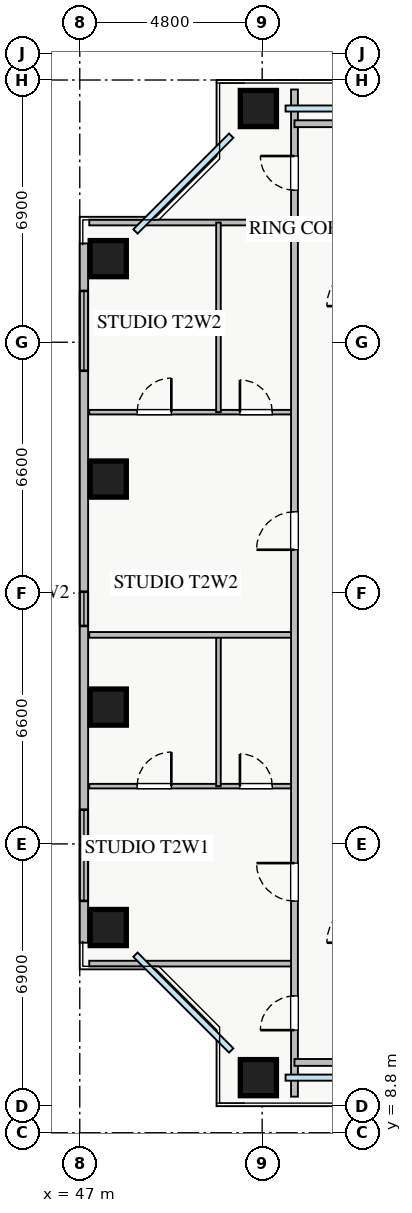
"""IFC4 building model, lengths in metres.
Left out: names, types, materials, properties, quantities, classifications, styles, units other than length and angle.
Written with IfcOpenShell. Run it as: python <this file> out.ifc"""

import sys

from ifc_helpers import new_model, si_unit, direction, frame, frame_2d, origin, origin_2d, place, context, subcontext, project, spatial, rectangle, extrude, source, transform, mapped, element, fill, save


model = new_model("IFC4")
c1 = context("Model", 3, precision=1e-05, world=origin(), true_north=direction((0.0, 1.0)))
c2 = subcontext(c1, "Body", "Model", "MODEL_VIEW")
j1 = project(units=[si_unit("LENGTHUNIT", "METRE"), si_unit("PLANEANGLEUNIT", "RADIAN")], contexts=[c1])
p1 = place(None, origin())
s1 = spatial("IfcSite", under=j1, at=p1, CompositionType="ELEMENT")
p2 = place(p1, origin())
s2 = spatial("IfcBuilding", under=s1, at=p2, CompositionType="ELEMENT")
p3 = place(p2, frame((0.0, 0.0, 56.75)))
s3 = spatial("IfcBuildingStorey", under=s2, at=p3, CompositionType="ELEMENT", Elevation=56.75)
m1 = source(origin(), c2, "Body", "SweptSolid", [
    extrude(rectangle(XDim=0.95, YDim=0.95, at=origin_2d()), origin(), (0.0, 0.0, 1.0), 3.25),
])
for number, where, z_axis, x_axis in (
    (1, (51.7, 10.25, 0.0), (0.0, 0.0, 1.0), (1.0, 0.0, 0.0)),
    (2, (51.7, 35.75, 0.0), (0.0, 0.0, 1.0), (1.0, 0.0, 0.0)),
    (3, (47.75, 14.2, 0.0), (0.0, 0.0, 1.0), (1.0, 0.0, 0.0)),
    (4, (47.75, 20.0, 0.0), (0.0, 0.0, 1.0), (1.0, 0.0, 0.0)),
    (5, (47.75, 26.0, 0.0), (0.0, 0.0, 1.0), (1.0, 0.0, 0.0)),
    (6, (47.75, 31.8, 0.0), (0.0, 0.0, 1.0), (1.0, 0.0, 0.0)),
):
    element("IfcColumn", number, at=place(p3, frame(where, z_axis=z_axis, x_axis=x_axis)), inside=s3, PredefinedType="COLUMN", context=c2, shape_type="MappedRepresentation", body=[
        mapped(m1, transform((0.0, 0.0, 0.0), x_axis=(1.0, 0.0, 0.0), y_axis=(0.0, 1.0, 0.0), z_axis=(0.0, 0.0, 1.0), scale=1.0)),
    ])
p4 = place(p3, frame((47.11, 13.8, 0.0), z_axis=(0.0, 0.0, 1.0), x_axis=(0.0, 1.0, 0.0)))
e7 = element("IfcWall", 7, at=p4, inside=s3, PredefinedType="STANDARD", context=c2, shape_type="SweptSolid", body=[
    extrude(rectangle(XDim=18.4, YDim=0.22, at=frame_2d((9.2, 0.0))), origin(), (0.0, 0.0, 1.0), 2.61),
])
p5 = place(p4, frame((1.1, 0.0, 0.9)))
e8 = element("IfcOpeningElement", 8, at=p5, cuts=e7, PredefinedType="OPENING", context=c2, shape_type="SweptSolid", body=[
    extrude(rectangle(XDim=2.4, YDim=1.48, at=frame_2d((1.2, 0.74))), frame((0.0, 0.12, 0.0), z_axis=(0.0, -1.0, 0.0), x_axis=(1.0, 0.0, 0.0)), (0.0, 0.0, 1.0), 0.24),
])
p6 = place(p4, frame((15.05, 0.0, 0.9)))
e9 = element("IfcOpeningElement", 9, at=p6, cuts=e7, PredefinedType="OPENING", context=c2, shape_type="SweptSolid", body=[
    extrude(rectangle(XDim=2.1, YDim=1.48, at=frame_2d((1.05, 0.74))), frame((0.0, 0.12, 0.0), z_axis=(0.0, -1.0, 0.0), x_axis=(1.0, 0.0, 0.0)), (0.0, 0.0, 1.0), 0.24),
])
p7 = place(p4, frame((8.335, 0.0, 0.9)))
e10 = element("IfcOpeningElement", 10, at=p7, cuts=e7, PredefinedType="OPENING", context=c2, shape_type="SweptSolid", body=[
    extrude(rectangle(XDim=0.9, YDim=1.2, at=frame_2d((0.45, 0.6))), frame((0.0, 0.12, 0.0), z_axis=(0.0, -1.0, 0.0), x_axis=(1.0, 0.0, 0.0)), (0.0, 0.0, 1.0), 0.24),
])
for number, where, z_axis, x_axis in (
    (11, (47.25, 32.75, 0.0), (0.0, 0.0, 1.0), (1.0, 0.0, 0.0)),
    (12, (47.25, 13.25, 0.0), (0.0, 0.0, 1.0), (1.0, 0.0, 0.0)),
):
    element("IfcWall", number, at=place(p3, frame(where, z_axis=z_axis, x_axis=x_axis)), inside=s3, PredefinedType="PARTITIONING", context=c2, shape_type="SweptSolid", body=[
        extrude(rectangle(XDim=5.4, YDim=0.15, at=frame_2d((2.7, 0.0))), origin(), (0.0, 0.0, 1.0), 3.07),
    ])
p8 = place(p3, frame((47.25, 17.92, 0.0), z_axis=(0.0, 0.0, 1.0), x_axis=(1.0, 0.0, 0.0)))
e13 = element("IfcWall", 13, at=p8, inside=s3, PredefinedType="PLUMBINGWALL", context=c2, shape_type="SweptSolid", body=[
    extrude(rectangle(XDim=5.4, YDim=0.12, at=frame_2d((2.7, 0.0))), origin(), (0.0, 0.0, 1.0), 3.07),
])
p9 = place(p8, frame((1.26, 0.0, 0.0)))
e14 = element("IfcOpeningElement", 14, at=p9, cuts=e13, PredefinedType="OPENING", context=c2, shape_type="SweptSolid", body=[
    extrude(rectangle(XDim=0.9, YDim=2.05, at=frame_2d((0.45, 1.025))), frame((0.0, 0.07, 0.0), z_axis=(0.0, -1.0, 0.0), x_axis=(1.0, 0.0, 0.0)), (0.0, 0.0, 1.0), 0.14),
])
p10 = place(p8, frame((3.965, 0.0, 0.0)))
e15 = element("IfcOpeningElement", 15, at=p10, cuts=e13, PredefinedType="OPENING", context=c2, shape_type="SweptSolid", body=[
    extrude(rectangle(XDim=0.85, YDim=2.05, at=frame_2d((0.425, 1.025))), frame((0.0, 0.07, 0.0), z_axis=(0.0, -1.0, 0.0), x_axis=(1.0, 0.0, 0.0)), (0.0, 0.0, 1.0), 0.14),
])
p11 = place(p3, frame((50.65, 17.92, 0.0), z_axis=(0.0, 0.0, 1.0), x_axis=(0.0, 1.0, 0.0)))
e16 = element("IfcWall", 16, at=p11, inside=s3, PredefinedType="PLUMBINGWALL", context=c2, shape_type="SweptSolid", body=[
    extrude(rectangle(XDim=3.98, YDim=0.12, at=frame_2d((1.99, 0.0))), origin(), (0.0, 0.0, 1.0), 3.07),
])
p12 = place(p3, frame((47.25, 27.76, 0.0), z_axis=(0.0, 0.0, 1.0), x_axis=(1.0, 0.0, 0.0)))
e17 = element("IfcWall", 17, at=p12, inside=s3, PredefinedType="PLUMBINGWALL", context=c2, shape_type="SweptSolid", body=[
    extrude(rectangle(XDim=5.4, YDim=0.12, at=frame_2d((2.7, 0.0))), origin(), (0.0, 0.0, 1.0), 3.07),
])
p13 = place(p12, frame((1.26, 0.0, 0.0)))
e18 = element("IfcOpeningElement", 18, at=p13, cuts=e17, PredefinedType="OPENING", context=c2, shape_type="SweptSolid", body=[
    extrude(rectangle(XDim=0.9, YDim=2.05, at=frame_2d((0.45, 1.025))), frame((0.0, 0.07, 0.0), z_axis=(0.0, -1.0, 0.0), x_axis=(1.0, 0.0, 0.0)), (0.0, 0.0, 1.0), 0.14),
])
p14 = place(p12, frame((3.965, 0.0, 0.0)))
e19 = element("IfcOpeningElement", 19, at=p14, cuts=e17, PredefinedType="OPENING", context=c2, shape_type="SweptSolid", body=[
    extrude(rectangle(XDim=0.85, YDim=2.05, at=frame_2d((0.425, 1.025))), frame((0.0, 0.07, 0.0), z_axis=(0.0, -1.0, 0.0), x_axis=(1.0, 0.0, 0.0)), (0.0, 0.0, 1.0), 0.14),
])
p15 = place(p3, frame((50.65, 27.76, 0.0), z_axis=(0.0, 0.0, 1.0), x_axis=(0.0, 1.0, 0.0)))
e20 = element("IfcWall", 20, at=p15, inside=s3, PredefinedType="PLUMBINGWALL", context=c2, shape_type="SweptSolid", body=[
    extrude(rectangle(XDim=4.99, YDim=0.12, at=frame_2d((2.495, 0.0))), origin(), (0.0, 0.0, 1.0), 3.07),
])
p16 = place(p3, frame((47.25, 21.9, 0.0), z_axis=(0.0, 0.0, 1.0), x_axis=(1.0, 0.0, 0.0)))
e21 = element("IfcWall", 21, at=p16, inside=s3, PredefinedType="PARTITIONING", context=c2, shape_type="SweptSolid", body=[
    extrude(rectangle(XDim=5.4, YDim=0.15, at=frame_2d((2.7, 0.0))), origin(), (0.0, 0.0, 1.0), 3.07),
])
p17 = place(p3, frame((52.65, 9.75, 0.0), z_axis=(0.0, 0.0, 1.0), x_axis=(0.0, 1.0, 0.0)))
e22 = element("IfcWall", 22, at=p17, inside=s3, PredefinedType="PARTITIONING", context=c2, shape_type="SweptSolid", body=[
    extrude(rectangle(XDim=26.5, YDim=0.18, at=frame_2d((13.25, 0.0))), origin(), (0.0, 0.0, 1.0), 3.07),
])
p18 = place(p17, frame((23.85, 0.0, 0.0)))
e23 = element("IfcOpeningElement", 23, at=p18, cuts=e22, PredefinedType="OPENING", context=c2, shape_type="SweptSolid", body=[
    extrude(rectangle(XDim=0.9, YDim=2.05, at=frame_2d((0.45, 1.025))), frame((0.0, 0.1, 0.0), z_axis=(0.0, -1.0, 0.0), x_axis=(1.0, 0.0, 0.0)), (0.0, 0.0, 1.0), 0.2),
])
p19 = place(p17, frame((1.75, 0.0, 0.0)))
e24 = element("IfcOpeningElement", 24, at=p19, cuts=e22, PredefinedType="OPENING", context=c2, shape_type="SweptSolid", body=[
    extrude(rectangle(XDim=0.9, YDim=2.05, at=frame_2d((0.45, 1.025))), frame((0.0, 0.1, 0.0), z_axis=(0.0, -1.0, 0.0), x_axis=(1.0, 0.0, 0.0)), (0.0, 0.0, 1.0), 0.2),
])
p20 = place(p17, frame((5.145, 0.0, 0.0)))
e25 = element("IfcOpeningElement", 25, at=p20, cuts=e22, PredefinedType="OPENING", context=c2, shape_type="SweptSolid", body=[
    extrude(rectangle(XDim=1.0, YDim=2.05, at=frame_2d((0.5, 1.025))), frame((0.0, 0.1, 0.0), z_axis=(0.0, -1.0, 0.0), x_axis=(1.0, 0.0, 0.0)), (0.0, 0.0, 1.0), 0.2),
])
p21 = place(p17, frame((14.39, 0.0, 0.0)))
e26 = element("IfcOpeningElement", 26, at=p21, cuts=e22, PredefinedType="OPENING", context=c2, shape_type="SweptSolid", body=[
    extrude(rectangle(XDim=1.0, YDim=2.05, at=frame_2d((0.5, 1.025))), frame((0.0, 0.1, 0.0), z_axis=(0.0, -1.0, 0.0), x_axis=(1.0, 0.0, 0.0)), (0.0, 0.0, 1.0), 0.2),
])
p22 = place(p3, frame((52.65, 35.35, 0.0), z_axis=(0.0, 0.0, 1.0), x_axis=(1.0, 0.0, 0.0)))
e27 = element("IfcWall", 27, at=p22, inside=s3, PredefinedType="PARTITIONING", context=c2, shape_type="SweptSolid", body=[
    extrude(rectangle(XDim=17.0, YDim=0.18, at=frame_2d((8.5, 0.0))), origin(), (0.0, 0.0, 1.0), 3.07),
])
p23 = place(p22, frame((3.825, 0.0, 0.0)))
e28 = element("IfcOpeningElement", 28, at=p23, cuts=e27, PredefinedType="OPENING", context=c2, shape_type="SweptSolid", body=[
    extrude(rectangle(XDim=0.9, YDim=2.05, at=frame_2d((0.45, 1.025))), frame((0.0, 0.1, 0.0), z_axis=(0.0, -1.0, 0.0), x_axis=(1.0, 0.0, 0.0)), (0.0, 0.0, 1.0), 0.2),
])
p24 = place(p22, frame((12.325, 0.0, 0.0)))
e29 = element("IfcOpeningElement", 29, at=p24, cuts=e27, PredefinedType="OPENING", context=c2, shape_type="SweptSolid", body=[
    extrude(rectangle(XDim=0.9, YDim=2.05, at=frame_2d((0.45, 1.025))), frame((0.0, 0.1, 0.0), z_axis=(0.0, -1.0, 0.0), x_axis=(1.0, 0.0, 0.0)), (0.0, 0.0, 1.0), 0.2),
])
p25 = place(p3, frame((52.65, 10.65, 0.0), z_axis=(0.0, 0.0, 1.0), x_axis=(1.0, 0.0, 0.0)))
e30 = element("IfcWall", 30, at=p25, inside=s3, PredefinedType="PARTITIONING", context=c2, shape_type="SweptSolid", body=[
    extrude(rectangle(XDim=17.0, YDim=0.18, at=frame_2d((8.5, 0.0))), origin(), (0.0, 0.0, 1.0), 3.07),
])
p26 = place(p25, frame((4.375, 0.0, 0.0)))
e31 = element("IfcOpeningElement", 31, at=p26, cuts=e30, PredefinedType="OPENING", context=c2, shape_type="SweptSolid", body=[
    extrude(rectangle(XDim=0.9, YDim=2.05, at=frame_2d((0.45, 1.025))), frame((0.0, 0.1, 0.0), z_axis=(0.0, -1.0, 0.0), x_axis=(1.0, 0.0, 0.0)), (0.0, 0.0, 1.0), 0.2),
])
p27 = place(p25, frame((12.875, 0.0, 0.0)))
e32 = element("IfcOpeningElement", 32, at=p27, cuts=e30, PredefinedType="OPENING", context=c2, shape_type="SweptSolid", body=[
    extrude(rectangle(XDim=0.9, YDim=2.05, at=frame_2d((0.45, 1.025))), frame((0.0, 0.1, 0.0), z_axis=(0.0, -1.0, 0.0), x_axis=(1.0, 0.0, 0.0)), (0.0, 0.0, 1.0), 0.2),
])
m2 = source(origin(), c2, "Body", "SweptSolid", [
    extrude(rectangle(XDim=2.4, YDim=1.48, at=frame_2d((1.2, 0.74))), frame((0.0, 0.03, 0.0), z_axis=(0.0, -1.0, 0.0), x_axis=(1.0, 0.0, 0.0)), (0.0, 0.0, 1.0), 0.06),
])
p28 = place(p5, origin())
e33 = element("IfcWindow", 33, at=p28, inside=s3, PartitioningType="TRIPLE_PANEL_VERTICAL", PredefinedType="WINDOW", context=c2, shape_type="MappedRepresentation", body=[
    mapped(m2, transform((0.0, 0.0, 0.0), x_axis=(1.0, 0.0, 0.0), y_axis=(0.0, 1.0, 0.0), z_axis=(0.0, 0.0, 1.0), scale=1.0)),
])
fill(e8, e33)
m3 = source(origin(), c2, "Body", "SweptSolid", [
    extrude(rectangle(XDim=2.1, YDim=1.48, at=frame_2d((1.05, 0.74))), frame((0.0, 0.03, 0.0), z_axis=(0.0, -1.0, 0.0), x_axis=(1.0, 0.0, 0.0)), (0.0, 0.0, 1.0), 0.06),
])
p29 = place(p6, origin())
e34 = element("IfcWindow", 34, at=p29, inside=s3, PartitioningType="TRIPLE_PANEL_VERTICAL", PredefinedType="WINDOW", context=c2, shape_type="MappedRepresentation", body=[
    mapped(m3, transform((0.0, 0.0, 0.0), x_axis=(1.0, 0.0, 0.0), y_axis=(0.0, 1.0, 0.0), z_axis=(0.0, 0.0, 1.0), scale=1.0)),
])
fill(e9, e34)
m4 = source(origin(), c2, "Body", "SweptSolid", [
    extrude(rectangle(XDim=0.9, YDim=2.05, at=frame_2d((0.45, 1.025))), frame((0.0, 0.025, 0.0), z_axis=(0.0, -1.0, 0.0), x_axis=(1.0, 0.0, 0.0)), (0.0, 0.0, 1.0), 0.05),
])
p30 = place(p9, origin())
e35 = element("IfcDoor", 35, at=p30, inside=s3, OperationType="SINGLE_SWING_RIGHT", PredefinedType="DOOR", context=c2, shape_type="MappedRepresentation", body=[
    mapped(m4, transform((0.0, 0.0, 0.0), x_axis=(1.0, 0.0, 0.0), y_axis=(0.0, 1.0, 0.0), z_axis=(0.0, 0.0, 1.0), scale=1.0)),
])
fill(e14, e35)
m5 = source(origin(), c2, "Body", "SweptSolid", [
    extrude(rectangle(XDim=0.85, YDim=2.05, at=frame_2d((0.425, 1.025))), frame((0.0, 0.025, 0.0), z_axis=(0.0, -1.0, 0.0), x_axis=(1.0, 0.0, 0.0)), (0.0, 0.0, 1.0), 0.05),
])
p31 = place(p10, origin())
e36 = element("IfcDoor", 36, at=p31, inside=s3, OperationType="SINGLE_SWING_LEFT", PredefinedType="DOOR", context=c2, shape_type="MappedRepresentation", body=[
    mapped(m5, transform((0.0, 0.0, 0.0), x_axis=(1.0, 0.0, 0.0), y_axis=(0.0, 1.0, 0.0), z_axis=(0.0, 0.0, 1.0), scale=1.0)),
])
fill(e15, e36)
p32 = place(p13, origin())
e37 = element("IfcDoor", 37, at=p32, inside=s3, OperationType="SINGLE_SWING_RIGHT", PredefinedType="DOOR", context=c2, shape_type="MappedRepresentation", body=[
    mapped(m4, transform((0.0, 0.0, 0.0), x_axis=(1.0, 0.0, 0.0), y_axis=(0.0, 1.0, 0.0), z_axis=(0.0, 0.0, 1.0), scale=1.0)),
])
fill(e18, e37)
p33 = place(p14, origin())
e38 = element("IfcDoor", 38, at=p33, inside=s3, OperationType="SINGLE_SWING_LEFT", PredefinedType="DOOR", context=c2, shape_type="MappedRepresentation", body=[
    mapped(m5, transform((0.0, 0.0, 0.0), x_axis=(1.0, 0.0, 0.0), y_axis=(0.0, 1.0, 0.0), z_axis=(0.0, 0.0, 1.0), scale=1.0)),
])
fill(e19, e38)
p34 = place(p18, origin())
e39 = element("IfcDoor", 39, at=p34, inside=s3, OperationType="SINGLE_SWING_RIGHT", PredefinedType="DOOR", context=c2, shape_type="MappedRepresentation", body=[
    mapped(m4, transform((0.0, 0.0, 0.0), x_axis=(1.0, 0.0, 0.0), y_axis=(0.0, 1.0, 0.0), z_axis=(0.0, 0.0, 1.0), scale=1.0)),
])
fill(e23, e39)
p35 = place(p19, origin())
e40 = element("IfcDoor", 40, at=p35, inside=s3, OperationType="SINGLE_SWING_LEFT", PredefinedType="DOOR", context=c2, shape_type="MappedRepresentation", body=[
    mapped(m4, transform((0.0, 0.0, 0.0), x_axis=(1.0, 0.0, 0.0), y_axis=(0.0, 1.0, 0.0), z_axis=(0.0, 0.0, 1.0), scale=1.0)),
])
fill(e24, e40)
m6 = source(origin(), c2, "Body", "SweptSolid", [
    extrude(rectangle(XDim=1.0, YDim=2.05, at=frame_2d((0.5, 1.025))), frame((0.0, 0.025, 0.0), z_axis=(0.0, -1.0, 0.0), x_axis=(1.0, 0.0, 0.0)), (0.0, 0.0, 1.0), 0.05),
])
p36 = place(p20, origin())
e41 = element("IfcDoor", 41, at=p36, inside=s3, OperationType="SINGLE_SWING_RIGHT", PredefinedType="DOOR", context=c2, shape_type="MappedRepresentation", body=[
    mapped(m6, transform((0.0, 0.0, 0.0), x_axis=(1.0, 0.0, 0.0), y_axis=(0.0, 1.0, 0.0), z_axis=(0.0, 0.0, 1.0), scale=1.0)),
])
fill(e25, e41)
p37 = place(p21, origin())
e42 = element("IfcDoor", 42, at=p37, inside=s3, OperationType="SINGLE_SWING_LEFT", PredefinedType="DOOR", context=c2, shape_type="MappedRepresentation", body=[
    mapped(m6, transform((0.0, 0.0, 0.0), x_axis=(1.0, 0.0, 0.0), y_axis=(0.0, 1.0, 0.0), z_axis=(0.0, 0.0, 1.0), scale=1.0)),
])
fill(e26, e42)
m7 = source(origin(), c2, "Body", "SweptSolid", [
    extrude(rectangle(XDim=0.9, YDim=1.2, at=frame_2d((0.45, 0.6))), frame((0.0, 0.03, 0.0), z_axis=(0.0, -1.0, 0.0), x_axis=(1.0, 0.0, 0.0)), (0.0, 0.0, 1.0), 0.06),
])
p38 = place(p7, origin())
e43 = element("IfcWindow", 43, at=p38, inside=s3, PartitioningType="SINGLE_PANEL", PredefinedType="WINDOW", context=c2, shape_type="MappedRepresentation", body=[
    mapped(m7, transform((0.0, 0.0, 0.0), x_axis=(1.0, 0.0, 0.0), y_axis=(0.0, 1.0, 0.0), z_axis=(0.0, 0.0, 1.0), scale=1.0)),
])
fill(e10, e43)
save(model, sys.argv[1])
